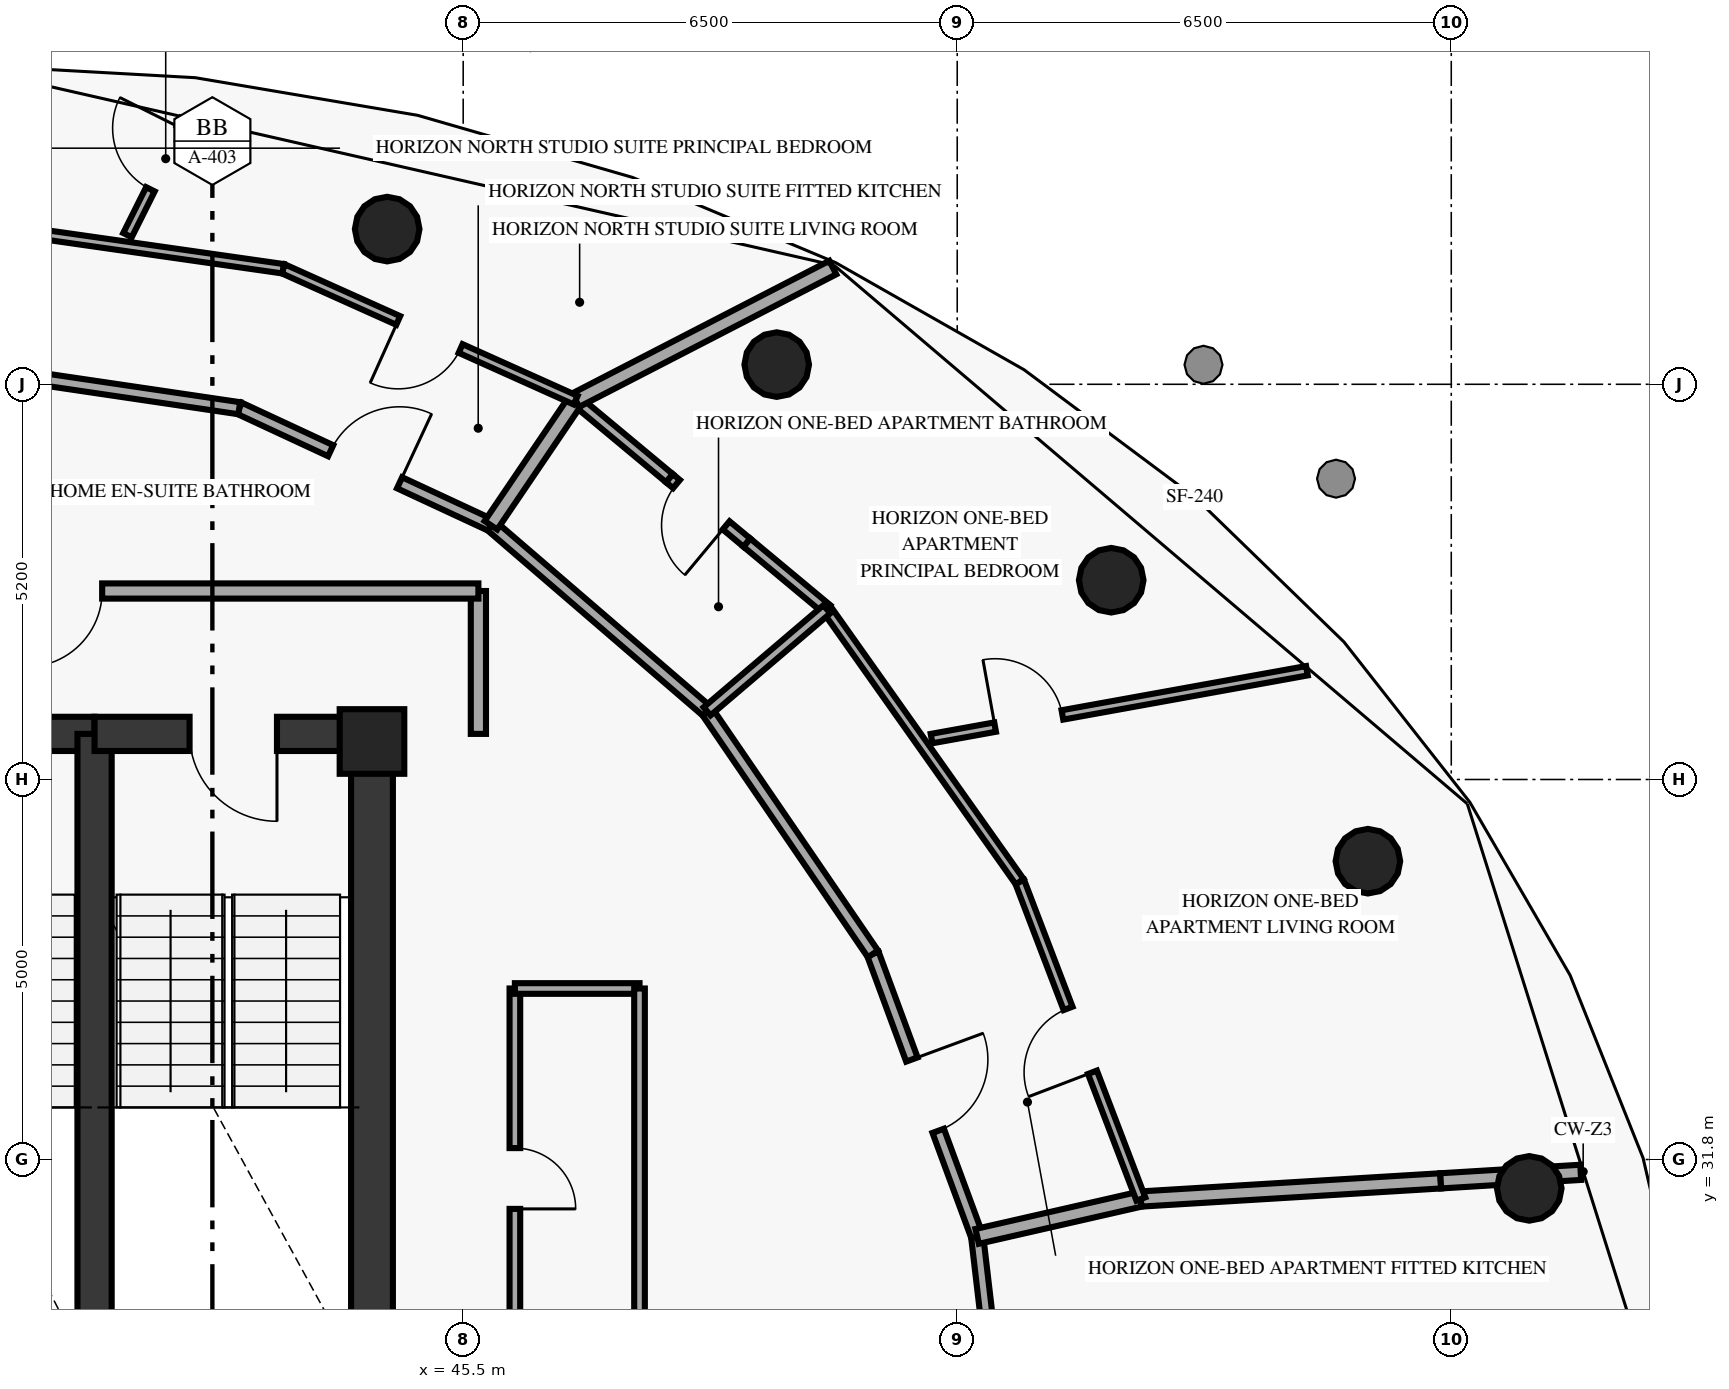
"""IFC4 building model, lengths in metres.
Left out: names, types, materials, properties, quantities, classifications, styles, units other than length and angle.
Written with IfcOpenShell. Run it as: python <this file> out.ifc"""

import sys

from ifc_helpers import new_model, si_unit, direction, frame, frame_2d, origin, origin_2d, place, context, subcontext, project, spatial, rectangle, circle, extrude, element, fill, save


model = new_model("IFC4")
c1 = context("Model", 3, precision=1e-05, world=origin(), true_north=direction((0.0, 1.0)))
c2 = subcontext(c1, "Body", "Model", "MODEL_VIEW")
j1 = project(units=[si_unit("LENGTHUNIT", "METRE"), si_unit("PLANEANGLEUNIT", "RADIAN")], contexts=[c1])
p1 = place(None, origin())
s1 = spatial("IfcSite", under=j1, at=p1, CompositionType="ELEMENT")
p2 = place(p1, origin())
s2 = spatial("IfcBuilding", under=s1, at=p2, CompositionType="ELEMENT")
p3 = place(p2, frame((0.0, 0.0, 251.95)))
s3 = spatial("IfcBuildingStorey", under=s2, at=p3, CompositionType="ELEMENT", Elevation=251.95)
p4 = place(p3, frame((44.3, 37.3, 0.0), z_axis=(0.0, 0.0, 1.0), x_axis=(1.0, 0.0, 0.0)))
e1 = element("IfcColumn", 1, at=p4, inside=s3, PredefinedType="PILASTER", context=c2, shape_type="SweptSolid", body=[
    extrude(rectangle(XDim=0.85, YDim=0.85, at=origin_2d()), origin(), (0.0, 0.0, 1.0), 3.39),
])
for number, where, z_axis, x_axis in (
    (2, (59.526, 31.42, 0.0), (0.0, 0.0, 1.0), (1.0, 0.0, 0.0)),
    (3, (57.403, 35.725, 0.0), (0.0, 0.0, 1.0), (1.0, 0.0, 0.0)),
    (4, (54.026, 39.422, 0.0), (0.0, 0.0, 1.0), (1.0, 0.0, 0.0)),
    (5, (49.625, 42.259, 0.0), (0.0, 0.0, 1.0), (1.0, 0.0, 0.0)),
    (6, (44.5, 44.042, 0.0), (0.0, 0.0, 1.0), (1.0, 0.0, 0.0)),
):
    element("IfcColumn", number, at=place(p3, frame(where, z_axis=z_axis, x_axis=x_axis)), inside=s3, PredefinedType="COLUMN", context=c2, shape_type="SweptSolid", body=[
        extrude(circle(Radius=0.425, at=origin_2d()), origin(), (0.0, 0.0, 1.0), 3.39),
    ])
p5 = place(p3, frame((44.3, 29.05, 0.0), z_axis=(0.0, 0.0, 1.0), x_axis=(0.0, 1.0, 0.0)))
e7 = element("IfcWall", 7, at=p5, inside=s3, PredefinedType="SHEAR", context=c2, shape_type="SweptSolid", body=[
    extrude(rectangle(XDim=8.35, YDim=0.55, at=frame_2d((4.175, 0.0))), origin(), (0.0, 0.0, 1.0), 3.39),
])
p6 = place(p3, frame((40.65, 37.4, 0.0), z_axis=(0.0, 0.0, 1.0), x_axis=(-1.0, 0.0, 0.0)))
e8 = element("IfcWall", 8, at=p6, inside=s3, PredefinedType="SHEAR", context=c2, shape_type="SweptSolid", body=[
    extrude(rectangle(XDim=3.3, YDim=0.45, at=frame_2d((1.65, 0.0))), origin(), (0.0, 0.0, 1.0), 3.39),
])
p7 = place(p6, frame((1.075, 0.0, 0.0)))
e9 = element("IfcOpeningElement", 9, at=p7, cuts=e8, PredefinedType="OPENING", context=c2, shape_type="SweptSolid", body=[
    extrude(rectangle(XDim=1.15, YDim=2.15, at=frame_2d((0.575, 1.075))), frame((0.0, 0.235, 0.0), z_axis=(0.0, -1.0, 0.0), x_axis=(1.0, 0.0, 0.0)), (0.0, 0.0, 1.0), 0.47),
])
p8 = place(p3, frame((40.65, 29.05, 0.0), z_axis=(0.0, 0.0, 1.0), x_axis=(0.0, 1.0, 0.0)))
e10 = element("IfcWall", 10, at=p8, inside=s3, PredefinedType="SHEAR", context=c2, shape_type="SweptSolid", body=[
    extrude(rectangle(XDim=8.35, YDim=0.45, at=frame_2d((4.175, 0.0))), origin(), (0.0, 0.0, 1.0), 3.39),
])
p9 = place(p3, frame((44.3, 37.4, 0.0), z_axis=(0.0, 0.0, 1.0), x_axis=(-1.0, 0.0, 0.0)))
e11 = element("IfcWall", 11, at=p9, inside=s3, PredefinedType="SHEAR", context=c2, shape_type="SweptSolid", body=[
    extrude(rectangle(XDim=3.65, YDim=0.45, at=frame_2d((1.825, 0.0))), origin(), (0.0, 0.0, 1.0), 3.39),
])
p10 = place(p9, frame((1.25, 0.0, 0.0)))
e12 = element("IfcOpeningElement", 12, at=p10, cuts=e11, PredefinedType="OPENING", context=c2, shape_type="SweptSolid", body=[
    extrude(rectangle(XDim=1.15, YDim=2.15, at=frame_2d((0.575, 1.075))), frame((0.0, 0.235, 0.0), z_axis=(0.0, -1.0, 0.0), x_axis=(1.0, 0.0, 0.0)), (0.0, 0.0, 1.0), 0.47),
])
p11 = place(p3, frame((45.7, 37.4, 0.0), z_axis=(0.0, 0.0, 1.0), x_axis=(0.0, 1.0, 0.0)))
e13 = element("IfcWall", 13, at=p11, inside=s3, PredefinedType="SOLIDWALL", context=c2, shape_type="SweptSolid", body=[
    extrude(rectangle(XDim=1.88, YDim=0.2, at=frame_2d((0.94, 0.0))), origin(), (0.0, 0.0, 1.0), 3.39),
])
p12 = place(p3, frame((45.7, 39.28, 0.0), z_axis=(0.0, 0.0, 1.0), x_axis=(-1.0, 0.0, 0.0)))
e14 = element("IfcWall", 14, at=p12, inside=s3, PredefinedType="SOLIDWALL", context=c2, shape_type="SweptSolid", body=[
    extrude(rectangle(XDim=6.6, YDim=0.2, at=frame_2d((3.3, 0.0))), origin(), (0.0, 0.0, 1.0), 3.39),
])
p13 = place(p12, frame((4.95, 0.0, 0.0)))
e15 = element("IfcOpeningElement", 15, at=p13, cuts=e14, PredefinedType="OPENING", context=c2, shape_type="SweptSolid", body=[
    extrude(rectangle(XDim=1.0, YDim=2.02, at=frame_2d((0.5, 1.01))), frame((0.0, 0.11, 0.0), z_axis=(0.0, -1.0, 0.0), x_axis=(1.0, 0.0, 0.0)), (0.0, 0.0, 1.0), 0.22),
])
p14 = place(p3, frame((46.18, 34.05, 0.0), z_axis=(0.0, 0.0, 1.0), x_axis=(0.0, -1.0, 0.0)))
e16 = element("IfcWall", 16, at=p14, inside=s3, PredefinedType="PARTITIONING", context=c2, shape_type="SweptSolid", body=[
    extrude(rectangle(XDim=5.0, YDim=0.14, at=frame_2d((2.5, 0.0))), origin(), (0.0, 0.0, 1.0), 3.39),
])
p15 = place(p14, frame((2.1, 0.0, 0.0)))
e17 = element("IfcOpeningElement", 17, at=p15, cuts=e16, PredefinedType="OPENING", context=c2, shape_type="SweptSolid", body=[
    extrude(rectangle(XDim=0.8, YDim=2.05, at=frame_2d((0.4, 1.025))), frame((0.0, 0.08, 0.0), z_axis=(0.0, -1.0, 0.0), x_axis=(1.0, 0.0, 0.0)), (0.0, 0.0, 1.0), 0.16),
])
p16 = place(p3, frame((46.18, 34.05, 0.0), z_axis=(0.0, 0.0, 1.0), x_axis=(1.0, 0.0, 0.0)))
e18 = element("IfcWall", 18, at=p16, inside=s3, PredefinedType="PARTITIONING", context=c2, shape_type="SweptSolid", body=[
    extrude(rectangle(XDim=1.64, YDim=0.14, at=frame_2d((0.82, 0.0))), origin(), (0.0, 0.0, 1.0), 3.39),
])
p17 = place(p3, frame((47.82, 29.05, 0.0), z_axis=(0.0, 0.0, 1.0), x_axis=(0.0, 1.0, 0.0)))
e19 = element("IfcWall", 19, at=p17, inside=s3, PredefinedType="PARTITIONING", context=c2, shape_type="SweptSolid", body=[
    extrude(rectangle(XDim=5.0, YDim=0.14, at=frame_2d((2.5, 0.0))), origin(), (0.0, 0.0, 1.0), 3.39),
])
p18 = place(p3, frame((52.73, 26.8, 0.0), z_axis=(0.0, 0.0, 1.0), x_axis=(-0.116555498827, 0.993184180146, 0.0)))
e20 = element("IfcWall", 20, at=p18, inside=s3, PredefinedType="PARTITIONING", context=c2, shape_type="SweptSolid", body=[
    extrude(rectangle(XDim=4.015, YDim=0.16, at=frame_2d((2.008, 0.0))), origin(), (0.0, 0.0, 1.0), 3.39),
])
p19 = place(p3, frame((50.891, 34.505, 0.0), z_axis=(0.0, 0.0, 1.0), x_axis=(0.346039479237, -0.938219952255, 0.0)))
e21 = element("IfcWall", 21, at=p19, inside=s3, PredefinedType="PARTITIONING", context=c2, shape_type="SweptSolid", body=[
    extrude(rectangle(XDim=3.961, YDim=0.16, at=frame_2d((1.981, 0.0))), origin(), (0.0, 0.0, 1.0), 3.39),
])
p20 = place(p19, frame((1.481, 0.0, 0.0)))
e22 = element("IfcOpeningElement", 22, at=p20, cuts=e21, PredefinedType="OPENING", context=c2, shape_type="SweptSolid", body=[
    extrude(rectangle(XDim=1.0, YDim=2.02, at=frame_2d((0.5, 1.01))), frame((0.0, 0.09, 0.0), z_axis=(0.0, -1.0, 0.0), x_axis=(1.0, 0.0, 0.0)), (0.0, 0.0, 1.0), 0.18),
])
p21 = place(p3, frame((50.891, 34.505, 0.0), z_axis=(0.0, 0.0, 1.0), x_axis=(-0.5643375537, 0.825544139028, 0.0)))
e23 = element("IfcWall", 23, at=p21, inside=s3, PredefinedType="PARTITIONING", context=c2, shape_type="SweptSolid", body=[
    extrude(rectangle(XDim=3.867, YDim=0.16, at=frame_2d((1.933, 0.0))), origin(), (0.0, 0.0, 1.0), 3.39),
])
p22 = place(p3, frame((48.709, 37.697, 0.0), z_axis=(0.0, 0.0, 1.0), x_axis=(-0.75790014932, 0.652370572344, 0.0)))
e24 = element("IfcWall", 24, at=p22, inside=s3, PredefinedType="PARTITIONING", context=c2, shape_type="SweptSolid", body=[
    extrude(rectangle(XDim=3.752, YDim=0.16, at=frame_2d((1.876, 0.0))), origin(), (0.0, 0.0, 1.0), 3.39),
])
p23 = place(p3, frame((42.554, 41.685, 0.0), z_axis=(0.0, 0.0, 1.0), x_axis=(0.906718733669, -0.421735862851, 0.0)))
e25 = element("IfcWall", 25, at=p23, inside=s3, PredefinedType="PARTITIONING", context=c2, shape_type="SweptSolid", body=[
    extrude(rectangle(XDim=3.652, YDim=0.16, at=frame_2d((1.826, 0.0))), origin(), (0.0, 0.0, 1.0), 3.39),
])
p24 = place(p23, frame((1.326, 0.0, 0.0)))
e26 = element("IfcOpeningElement", 26, at=p24, cuts=e25, PredefinedType="OPENING", context=c2, shape_type="SweptSolid", body=[
    extrude(rectangle(XDim=1.0, YDim=2.02, at=frame_2d((0.5, 1.01))), frame((0.0, 0.09, 0.0), z_axis=(0.0, -1.0, 0.0), x_axis=(1.0, 0.0, 0.0)), (0.0, 0.0, 1.0), 0.18),
])
p25 = place(p3, frame((42.554, 41.685, 0.0), z_axis=(0.0, 0.0, 1.0), x_axis=(-0.989268313231, 0.146110247541, 0.0)))
e27 = element("IfcWall", 27, at=p25, inside=s3, PredefinedType="PARTITIONING", context=c2, shape_type="SweptSolid", body=[
    extrude(rectangle(XDim=3.593, YDim=0.16, at=frame_2d((1.796, 0.0))), origin(), (0.0, 0.0, 1.0), 3.39),
])
p26 = place(p3, frame((52.262, 30.788, 0.0), z_axis=(0.0, 0.0, 1.0), x_axis=(0.974898951109, 0.222647782668, 0.0)))
e28 = element("IfcWall", 28, at=p26, inside=s3, PredefinedType="PARTITIONING", context=c2, shape_type="SweptSolid", body=[
    extrude(rectangle(XDim=2.209, YDim=0.2, at=frame_2d((1.105, 0.0))), origin(), (0.0, 0.0, 1.0), 2.19),
])
p27 = place(p3, frame((54.416, 31.28, 0.0), z_axis=(0.0, 0.0, 1.0), x_axis=(0.998169739768, 0.06047454516, 0.0)))
e29 = element("IfcWall", 29, at=p27, inside=s3, PredefinedType="PARTITIONING", context=c2, shape_type="SweptSolid", body=[
    extrude(rectangle(XDim=3.952, YDim=0.2, at=frame_2d((1.976, 0.0))), origin(), (0.0, 0.0, 1.0), 3.39),
])
p28 = place(p3, frame((58.361, 31.519, 0.0), z_axis=(0.0, 0.0, 1.0), x_axis=(0.998154184544, 0.060730749033, 0.0)))
e30 = element("IfcWall", 30, at=p28, inside=s3, PredefinedType="PARTITIONING", context=c2, shape_type="SweptSolid", body=[
    extrude(rectangle(XDim=1.845, YDim=0.2, at=frame_2d((0.923, 0.0))), origin(), (0.0, 0.0, 1.0), 2.19),
])
p29 = place(p3, frame((52.822, 35.455, 0.0), z_axis=(0.0, 0.0, 1.0), x_axis=(0.356679026334, -0.934226991782, 0.0)))
e31 = element("IfcWall", 31, at=p29, inside=s3, PredefinedType="PARTITIONING", context=c2, shape_type="SweptSolid", body=[
    extrude(rectangle(XDim=4.469, YDim=0.125, at=frame_2d((2.234, 0.0))), origin(), (0.0, 0.0, 1.0), 3.39),
])
p30 = place(p29, frame((1.784, 0.0, 0.0)))
e32 = element("IfcOpeningElement", 32, at=p30, cuts=e31, PredefinedType="OPENING", context=c2, shape_type="SweptSolid", body=[
    extrude(rectangle(XDim=0.9, YDim=2.02, at=frame_2d((0.45, 1.01))), frame((0.0, 0.073, 0.0), z_axis=(0.0, -1.0, 0.0), x_axis=(1.0, 0.0, 0.0)), (0.0, 0.0, 1.0), 0.145),
])
p31 = place(p3, frame((52.822, 35.455, 0.0), z_axis=(0.0, 0.0, 1.0), x_axis=(-0.577677974694, 0.81626475947, 0.0)))
e33 = element("IfcWall", 33, at=p31, inside=s3, PredefinedType="PARTITIONING", context=c2, shape_type="SweptSolid", body=[
    extrude(rectangle(XDim=4.392, YDim=0.125, at=frame_2d((2.196, 0.0))), origin(), (0.0, 0.0, 1.0), 3.39),
])
p32 = place(p3, frame((46.98, 41.791, 0.0), z_axis=(0.0, 0.0, 1.0), x_axis=(0.768632414363, -0.639690715573, 0.0)))
e34 = element("IfcWall", 34, at=p32, inside=s3, PredefinedType="PARTITIONING", context=c2, shape_type="SweptSolid", body=[
    extrude(rectangle(XDim=1.606, YDim=0.14, at=frame_2d((0.803, 0.0))), origin(), (0.0, 0.0, 1.0), 3.39),
])
p33 = place(p3, frame((48.214, 40.764, 0.0), z_axis=(0.0, 0.0, 1.0), x_axis=(0.76862875953, -0.639695107081, 0.0)))
e35 = element("IfcWall", 35, at=p33, inside=s3, PredefinedType="PARTITIONING", context=c2, shape_type="SweptSolid", body=[
    extrude(rectangle(XDim=1.325, YDim=0.14, at=frame_2d((0.663, 0.0))), origin(), (0.0, 0.0, 1.0), 2.85),
])
p34 = place(p33, frame((0.12, 0.0, 0.0)))
e36 = element("IfcOpeningElement", 36, at=p34, cuts=e35, PredefinedType="OPENING", context=c2, shape_type="SweptSolid", body=[
    extrude(rectangle(XDim=0.85, YDim=2.02, at=frame_2d((0.425, 1.01))), frame((0.0, 0.08, 0.0), z_axis=(0.0, -1.0, 0.0), x_axis=(1.0, 0.0, 0.0)), (0.0, 0.0, 1.0), 0.16),
])
p35 = place(p3, frame((49.233, 39.916, 0.0), z_axis=(0.0, 0.0, 1.0), x_axis=(0.768469729138, -0.639886142527, 0.0)))
e37 = element("IfcWall", 37, at=p35, inside=s3, PredefinedType="PARTITIONING", context=c2, shape_type="SweptSolid", body=[
    extrude(rectangle(XDim=1.369, YDim=0.14, at=frame_2d((0.685, 0.0))), origin(), (0.0, 0.0, 1.0), 3.39),
])
p36 = place(p3, frame((48.709, 37.697, 0.0), z_axis=(0.0, 0.0, 1.0), x_axis=(0.7611095579, 0.648623342837, 0.0)))
e38 = element("IfcWall", 38, at=p36, inside=s3, PredefinedType="PARTITIONING", context=c2, shape_type="SweptSolid", body=[
    extrude(rectangle(XDim=2.071, YDim=0.14, at=frame_2d((1.035, 0.0))), origin(), (0.0, 0.0, 1.0), 3.39),
])
p37 = place(p3, frame((51.662, 37.338, 0.0), z_axis=(0.0, 0.0, 1.0), x_axis=(0.98404223012, 0.177935070577, 0.0)))
e39 = element("IfcWall", 39, at=p37, inside=s3, PredefinedType="PARTITIONING", context=c2, shape_type="SweptSolid", body=[
    extrude(rectangle(XDim=5.019, YDim=0.125, at=frame_2d((2.51, 0.0))), origin(), (0.0, 0.0, 1.0), 3.39),
])
p38 = place(p37, frame((0.85, 0.0, 0.0)))
e40 = element("IfcOpeningElement", 40, at=p38, cuts=e39, PredefinedType="OPENING", context=c2, shape_type="SweptSolid", body=[
    extrude(rectangle(XDim=0.9, YDim=2.02, at=frame_2d((0.45, 1.01))), frame((0.0, 0.073, 0.0), z_axis=(0.0, -1.0, 0.0), x_axis=(1.0, 0.0, 0.0)), (0.0, 0.0, 1.0), 0.145),
])
p39 = place(p3, frame((45.865, 40.145, 0.0), z_axis=(0.0, 0.0, 1.0), x_axis=(0.560834568606, 0.827927887353, 0.0)))
e41 = element("IfcWall", 41, at=p39, inside=s3, PredefinedType="PARTITIONING", context=c2, shape_type="SweptSolid", body=[
    extrude(rectangle(XDim=1.988, YDim=0.2, at=frame_2d((0.994, 0.0))), origin(), (0.0, 0.0, 1.0), 3.39),
])
p40 = place(p3, frame((46.98, 41.791, 0.0), z_axis=(0.0, 0.0, 1.0), x_axis=(0.888751319937, 0.458389671905, 0.0)))
e42 = element("IfcWall", 42, at=p40, inside=s3, PredefinedType="PARTITIONING", context=c2, shape_type="SweptSolid", body=[
    extrude(rectangle(XDim=3.807, YDim=0.2, at=frame_2d((1.903, 0.0))), origin(), (0.0, 0.0, 1.0), 3.39),
])
p41 = place(p3, frame((43.131, 43.52, 0.0), z_axis=(0.0, 0.0, 1.0), x_axis=(0.912186563344, -0.409775150118, 0.0)))
e43 = element("IfcWall", 43, at=p41, inside=s3, PredefinedType="PARTITIONING", context=c2, shape_type="SweptSolid", body=[
    extrude(rectangle(XDim=4.219, YDim=0.125, at=frame_2d((2.11, 0.0))), origin(), (0.0, 0.0, 1.0), 3.39),
])
p42 = place(p41, frame((1.66, 0.0, 0.0)))
e44 = element("IfcOpeningElement", 44, at=p42, cuts=e43, PredefinedType="OPENING", context=c2, shape_type="SweptSolid", body=[
    extrude(rectangle(XDim=0.9, YDim=2.02, at=frame_2d((0.45, 1.01))), frame((0.0, 0.073, 0.0), z_axis=(0.0, -1.0, 0.0), x_axis=(1.0, 0.0, 0.0)), (0.0, 0.0, 1.0), 0.145),
])
p43 = place(p3, frame((43.131, 43.52, 0.0), z_axis=(0.0, 0.0, 1.0), x_axis=(-0.989951833699, 0.141404975004, 0.0)))
e45 = element("IfcWall", 45, at=p43, inside=s3, PredefinedType="PARTITIONING", context=c2, shape_type="SweptSolid", body=[
    extrude(rectangle(XDim=4.173, YDim=0.125, at=frame_2d((2.086, 0.0))), origin(), (0.0, 0.0, 1.0), 3.39),
])
p44 = place(p3, frame((41.083, 43.962, 0.0), z_axis=(0.0, 0.0, 1.0), x_axis=(0.4472135955, 0.894427191, 0.0)))
e46 = element("IfcWall", 46, at=p44, inside=s3, PredefinedType="PARTITIONING", context=c2, shape_type="SweptSolid", body=[
    extrude(rectangle(XDim=1.695, YDim=0.125, at=frame_2d((0.848, 0.0))), origin(), (0.0, 0.0, 1.0), 3.39),
])
p45 = place(p44, frame((0.675, 0.0, 0.0)))
e47 = element("IfcOpeningElement", 47, at=p45, cuts=e46, PredefinedType="OPENING", context=c2, shape_type="SweptSolid", body=[
    extrude(rectangle(XDim=0.9, YDim=2.02, at=frame_2d((0.45, 1.01))), frame((0.0, 0.073, 0.0), z_axis=(0.0, -1.0, 0.0), x_axis=(1.0, 0.0, 0.0)), (0.0, 0.0, 1.0), 0.145),
])
p46 = place(p10, origin())
e48 = element("IfcDoor", 48, at=p46, inside=s3, OperationType="SINGLE_SWING_LEFT", PredefinedType="DOOR", context=c2, shape_type="SweptSolid", body=[
    extrude(rectangle(XDim=1.15, YDim=2.15, at=frame_2d((0.575, 1.075))), frame((0.0, 0.025, 0.0), z_axis=(0.0, -1.0, 0.0), x_axis=(1.0, 0.0, 0.0)), (0.0, 0.0, 1.0), 0.05),
])
fill(e12, e48)
p47 = place(p13, origin())
e49 = element("IfcDoor", 49, at=p47, inside=s3, OperationType="SINGLE_SWING_RIGHT", PredefinedType="DOOR", context=c2, shape_type="SweptSolid", body=[
    extrude(rectangle(XDim=1.0, YDim=2.02, at=frame_2d((0.5, 1.01))), frame((0.0, 0.025, 0.0), z_axis=(0.0, -1.0, 0.0), x_axis=(1.0, 0.0, 0.0)), (0.0, 0.0, 1.0), 0.05),
])
fill(e15, e49)
p48 = place(p15, origin())
e50 = element("IfcDoor", 50, at=p48, inside=s3, OperationType="SINGLE_SWING_RIGHT", PredefinedType="DOOR", context=c2, shape_type="SweptSolid", body=[
    extrude(rectangle(XDim=0.8, YDim=2.05, at=frame_2d((0.4, 1.025))), frame((0.0, 0.025, 0.0), z_axis=(0.0, -1.0, 0.0), x_axis=(1.0, 0.0, 0.0)), (0.0, 0.0, 1.0), 0.05),
])
fill(e17, e50)
p49 = place(p20, origin())
e51 = element("IfcDoor", 51, at=p49, inside=s3, OperationType="SINGLE_SWING_LEFT", PredefinedType="DOOR", context=c2, shape_type="SweptSolid", body=[
    extrude(rectangle(XDim=1.0, YDim=2.02, at=frame_2d((0.5, 1.01))), frame((0.0, 0.025, 0.0), z_axis=(0.0, -1.0, 0.0), x_axis=(1.0, 0.0, 0.0)), (0.0, 0.0, 1.0), 0.05),
])
fill(e22, e51)
p50 = place(p24, origin())
e52 = element("IfcDoor", 52, at=p50, inside=s3, OperationType="SINGLE_SWING_RIGHT", PredefinedType="DOOR", context=c2, shape_type="SweptSolid", body=[
    extrude(rectangle(XDim=1.0, YDim=2.02, at=frame_2d((0.5, 1.01))), frame((0.0, 0.025, 0.0), z_axis=(0.0, -1.0, 0.0), x_axis=(1.0, 0.0, 0.0)), (0.0, 0.0, 1.0), 0.05),
])
fill(e26, e52)
p51 = place(p30, origin())
e53 = element("IfcDoor", 53, at=p51, inside=s3, OperationType="SINGLE_SWING_RIGHT", PredefinedType="DOOR", context=c2, shape_type="SweptSolid", body=[
    extrude(rectangle(XDim=0.9, YDim=2.02, at=frame_2d((0.45, 1.01))), frame((0.0, 0.025, 0.0), z_axis=(0.0, -1.0, 0.0), x_axis=(1.0, 0.0, 0.0)), (0.0, 0.0, 1.0), 0.05),
])
fill(e32, e53)
p52 = place(p34, origin())
e54 = element("IfcDoor", 54, at=p52, inside=s3, OperationType="SINGLE_SWING_RIGHT", PredefinedType="DOOR", context=c2, shape_type="SweptSolid", body=[
    extrude(rectangle(XDim=0.85, YDim=2.02, at=frame_2d((0.425, 1.01))), frame((0.0, 0.025, 0.0), z_axis=(0.0, -1.0, 0.0), x_axis=(1.0, 0.0, 0.0)), (0.0, 0.0, 1.0), 0.05),
])
fill(e36, e54)
p53 = place(p38, origin())
e55 = element("IfcDoor", 55, at=p53, inside=s3, OperationType="SINGLE_SWING_LEFT", PredefinedType="DOOR", context=c2, shape_type="SweptSolid", body=[
    extrude(rectangle(XDim=0.9, YDim=2.02, at=frame_2d((0.45, 1.01))), frame((0.0, 0.025, 0.0), z_axis=(0.0, -1.0, 0.0), x_axis=(1.0, 0.0, 0.0)), (0.0, 0.0, 1.0), 0.05),
])
fill(e40, e55)
p54 = place(p42, origin())
e56 = element("IfcDoor", 56, at=p54, inside=s3, OperationType="SINGLE_SWING_LEFT", PredefinedType="DOOR", context=c2, shape_type="SweptSolid", body=[
    extrude(rectangle(XDim=0.9, YDim=2.02, at=frame_2d((0.45, 1.01))), frame((0.0, 0.025, 0.0), z_axis=(0.0, -1.0, 0.0), x_axis=(1.0, 0.0, 0.0)), (0.0, 0.0, 1.0), 0.05),
])
fill(e44, e56)
p55 = place(p45, origin())
e57 = element("IfcDoor", 57, at=p55, inside=s3, OperationType="SINGLE_SWING_RIGHT", PredefinedType="DOOR", context=c2, shape_type="SweptSolid", body=[
    extrude(rectangle(XDim=0.9, YDim=2.02, at=frame_2d((0.45, 1.01))), frame((0.0, 0.025, 0.0), z_axis=(0.0, -1.0, 0.0), x_axis=(1.0, 0.0, 0.0)), (0.0, 0.0, 1.0), 0.05),
])
fill(e47, e57)
save(model, sys.argv[1])
